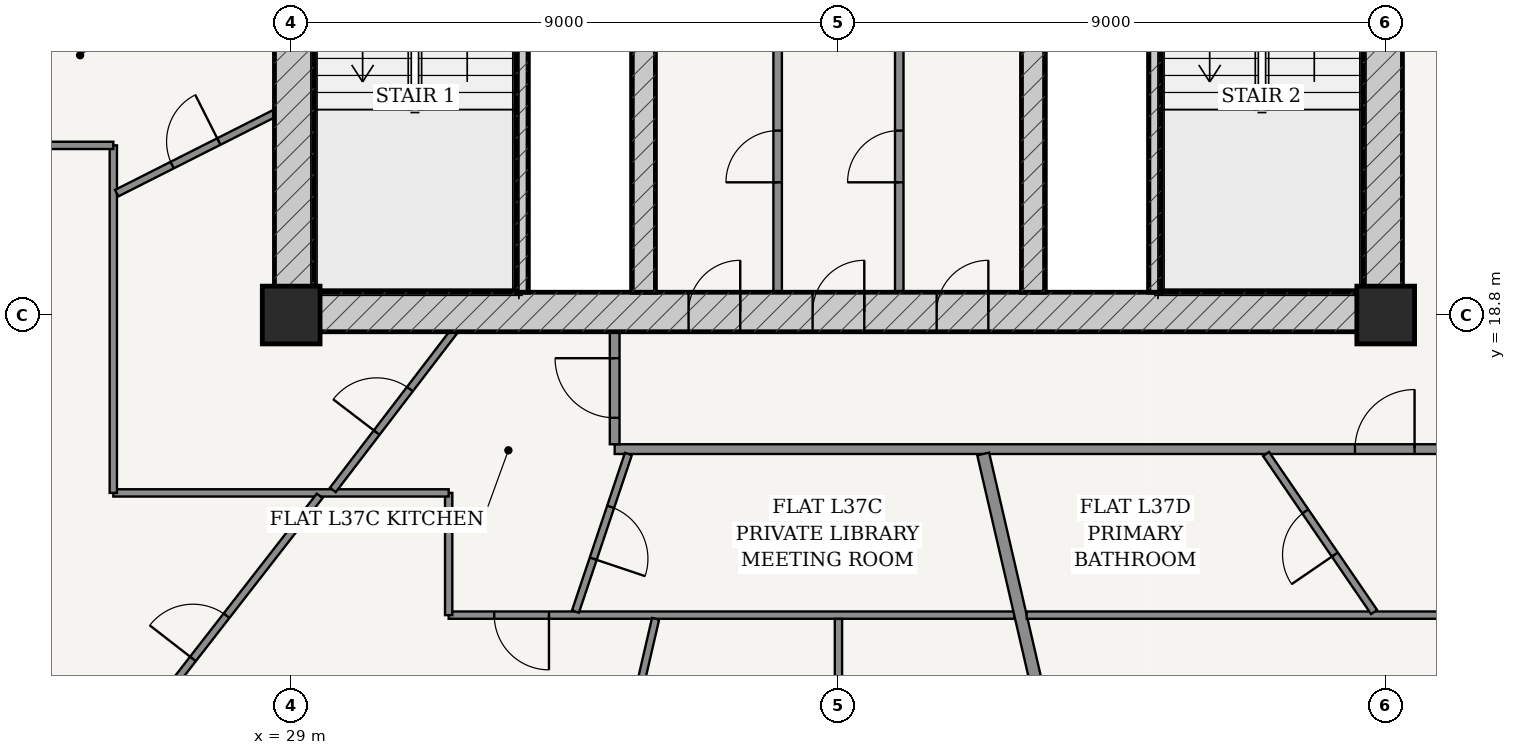
"""IFC4 building model, lengths in metres.
Left out: names, types, materials, properties, quantities, classifications, styles, units other than length and angle.
Written with IfcOpenShell. Run it as: python <this file> out.ifc"""

import sys

from ifc_helpers import new_model, si_unit, direction, frame, frame_2d, origin, origin_2d, place, context, subcontext, project, spatial, rectangle, extrude, source, transform, mapped, element, fill, save


model = new_model("IFC4")
c1 = context("Model", 3, precision=1e-05, world=origin(), true_north=direction((-0.2419218956, 0.970295726276)))
c2 = subcontext(c1, "Body", "Model", "MODEL_VIEW")
j1 = project(units=[si_unit("LENGTHUNIT", "METRE"), si_unit("PLANEANGLEUNIT", "RADIAN")], contexts=[c1])
p1 = place(None, origin())
s1 = spatial("IfcSite", under=j1, at=p1, CompositionType="ELEMENT")
p2 = place(p1, origin())
s2 = spatial("IfcBuilding", under=s1, at=p2, CompositionType="ELEMENT")
p3 = place(p2, frame((0.0, 0.0, 142.6)))
s3 = spatial("IfcBuildingStorey", under=s2, at=p3, CompositionType="ELEMENT", Elevation=142.6)
for number, where, z_axis, x_axis in (
    (1, (29.0, 18.8, 0.0), (0.0, 0.0, 1.0), (1.0, 0.0, 0.0)),
    (2, (47.0, 18.8, 0.0), (0.0, 0.0, 1.0), (1.0, 0.0, 0.0)),
):
    element("IfcColumn", number, at=place(p3, frame(where, z_axis=z_axis, x_axis=x_axis)), inside=s3, PredefinedType="COLUMN", context=c2, shape_type="SweptSolid", body=[
        extrude(rectangle(XDim=0.95, YDim=0.95, at=origin_2d()), origin(), (0.0, 0.0, 1.0), 3.6),
    ])
p4 = place(p3, frame((28.725, 18.85, 0.0), z_axis=(0.0, 0.0, 1.0), x_axis=(1.0, 0.0, 0.0)))
e3 = element("IfcWall", 3, at=p4, inside=s3, PredefinedType="SHEAR", context=c2, shape_type="SweptSolid", body=[
    extrude(rectangle(XDim=18.55, YDim=0.65, at=frame_2d((9.275, 0.0))), origin(), (0.0, 0.0, 1.0), 3.33),
])
p5 = place(p4, frame((6.81, 0.0, 0.0)))
e4 = element("IfcOpeningElement", 4, at=p5, cuts=e3, PredefinedType="OPENING", context=c2, shape_type="SweptSolid", body=[
    extrude(rectangle(XDim=0.85, YDim=2.1, at=frame_2d((0.425, 1.05))), frame((0.0, 0.335, 0.0), z_axis=(0.0, -1.0, 0.0), x_axis=(1.0, 0.0, 0.0)), (0.0, 0.0, 1.0), 0.67),
])
p6 = place(p4, frame((8.85, 0.0, 0.0)))
e5 = element("IfcOpeningElement", 5, at=p6, cuts=e3, PredefinedType="OPENING", context=c2, shape_type="SweptSolid", body=[
    extrude(rectangle(XDim=0.85, YDim=2.1, at=frame_2d((0.425, 1.05))), frame((0.0, 0.335, 0.0), z_axis=(0.0, -1.0, 0.0), x_axis=(1.0, 0.0, 0.0)), (0.0, 0.0, 1.0), 0.67),
])
p7 = place(p4, frame((10.89, 0.0, 0.0)))
e6 = element("IfcOpeningElement", 6, at=p7, cuts=e3, PredefinedType="OPENING", context=c2, shape_type="SweptSolid", body=[
    extrude(rectangle(XDim=0.85, YDim=2.1, at=frame_2d((0.425, 1.05))), frame((0.0, 0.335, 0.0), z_axis=(0.0, -1.0, 0.0), x_axis=(1.0, 0.0, 0.0)), (0.0, 0.0, 1.0), 0.67),
])
p8 = place(p3, frame((29.05, 19.175, 0.0), z_axis=(0.0, 0.0, 1.0), x_axis=(0.0, 1.0, 0.0)))
e7 = element("IfcWall", 7, at=p8, inside=s3, PredefinedType="SHEAR", context=c2, shape_type="SweptSolid", body=[
    extrude(rectangle(XDim=15.25, YDim=0.65, at=frame_2d((7.625, 0.0))), origin(), (0.0, 0.0, 1.0), 3.33),
])
p9 = place(p8, frame((9.875, 0.0, 0.0)))
e8 = element("IfcOpeningElement", 8, at=p9, cuts=e7, PredefinedType="OPENING", context=c2, shape_type="SweptSolid", body=[
    extrude(rectangle(XDim=1.5, YDim=2.2, at=frame_2d((0.75, 1.1))), frame((0.0, 0.335, 0.0), z_axis=(0.0, -1.0, 0.0), x_axis=(1.0, 0.0, 0.0)), (0.0, 0.0, 1.0), 0.67),
])
p10 = place(p3, frame((46.95, 19.175, 0.0), z_axis=(0.0, 0.0, 1.0), x_axis=(0.0, 1.0, 0.0)))
e9 = element("IfcWall", 9, at=p10, inside=s3, PredefinedType="SHEAR", context=c2, shape_type="SweptSolid", body=[
    extrude(rectangle(XDim=15.25, YDim=0.65, at=frame_2d((7.625, 0.0))), origin(), (0.0, 0.0, 1.0), 3.33),
])
p11 = place(p10, frame((9.875, 0.0, 0.0)))
e10 = element("IfcOpeningElement", 10, at=p11, cuts=e9, PredefinedType="OPENING", context=c2, shape_type="SweptSolid", body=[
    extrude(rectangle(XDim=1.5, YDim=2.2, at=frame_2d((0.75, 1.1))), frame((0.0, 0.335, 0.0), z_axis=(0.0, -1.0, 0.0), x_axis=(1.0, 0.0, 0.0)), (0.0, 0.0, 1.0), 0.67),
])
for number, where, z_axis, x_axis in (
    (11, (32.795, 19.175, 0.0), (0.0, 0.0, 1.0), (0.0, 1.0, 0.0)),
    (12, (43.205, 19.175, 0.0), (0.0, 0.0, 1.0), (0.0, 1.0, 0.0)),
):
    element("IfcWall", number, at=place(p3, frame(where, z_axis=z_axis, x_axis=x_axis)), inside=s3, PredefinedType="SOLIDWALL", context=c2, shape_type="SweptSolid", body=[
        extrude(rectangle(XDim=7.375, YDim=0.2, at=frame_2d((3.688, 0.0))), origin(), (0.0, 0.0, 1.0), 3.33),
    ])
p12 = place(p3, frame((34.8, 19.175, 0.0), z_axis=(0.0, 0.0, 1.0), x_axis=(0.0, 1.0, 0.0)))
e13 = element("IfcWall", 13, at=p12, inside=s3, PredefinedType="SHEAR", context=c2, shape_type="SweptSolid", body=[
    extrude(rectangle(XDim=15.25, YDim=0.38, at=frame_2d((7.625, 0.0))), origin(), (0.0, 0.0, 1.0), 3.33),
])
p13 = place(p12, frame((7.8, 0.0, 0.0)))
e14 = element("IfcOpeningElement", 14, at=p13, cuts=e13, PredefinedType="OPENING", context=c2, shape_type="SweptSolid", body=[
    extrude(rectangle(XDim=1.05, YDim=2.15, at=frame_2d((0.525, 1.075))), frame((0.0, 0.2, 0.0), z_axis=(0.0, -1.0, 0.0), x_axis=(1.0, 0.0, 0.0)), (0.0, 0.0, 1.0), 0.4),
])
p14 = place(p3, frame((41.2, 19.175, 0.0), z_axis=(0.0, 0.0, 1.0), x_axis=(0.0, 1.0, 0.0)))
e15 = element("IfcWall", 15, at=p14, inside=s3, PredefinedType="SHEAR", context=c2, shape_type="SweptSolid", body=[
    extrude(rectangle(XDim=15.25, YDim=0.38, at=frame_2d((7.625, 0.0))), origin(), (0.0, 0.0, 1.0), 3.33),
])
p15 = place(p14, frame((7.8, 0.0, 0.0)))
e16 = element("IfcOpeningElement", 16, at=p15, cuts=e15, PredefinedType="OPENING", context=c2, shape_type="SweptSolid", body=[
    extrude(rectangle(XDim=1.05, YDim=2.15, at=frame_2d((0.525, 1.075))), frame((0.0, 0.2, 0.0), z_axis=(0.0, -1.0, 0.0), x_axis=(1.0, 0.0, 0.0)), (0.0, 0.0, 1.0), 0.4),
])
p16 = place(p3, frame((37.0, 19.175, 0.0), z_axis=(0.0, 0.0, 1.0), x_axis=(0.0, 1.0, 0.0)))
e17 = element("IfcWall", 17, at=p16, inside=s3, PredefinedType="PARTITIONING", context=c2, shape_type="SweptSolid", body=[
    extrude(rectangle(XDim=4.465, YDim=0.14, at=frame_2d((2.232, 0.0))), origin(), (0.0, 0.0, 1.0), 3.33),
])
p17 = place(p16, frame((1.808, 0.0, 0.0)))
e18 = element("IfcOpeningElement", 18, at=p17, cuts=e17, PredefinedType="OPENING", context=c2, shape_type="SweptSolid", body=[
    extrude(rectangle(XDim=0.85, YDim=2.1, at=frame_2d((0.425, 1.05))), frame((0.0, 0.08, 0.0), z_axis=(0.0, -1.0, 0.0), x_axis=(1.0, 0.0, 0.0)), (0.0, 0.0, 1.0), 0.16),
])
p18 = place(p3, frame((39.0, 19.175, 0.0), z_axis=(0.0, 0.0, 1.0), x_axis=(0.0, 1.0, 0.0)))
e19 = element("IfcWall", 19, at=p18, inside=s3, PredefinedType="PARTITIONING", context=c2, shape_type="SweptSolid", body=[
    extrude(rectangle(XDim=4.465, YDim=0.14, at=frame_2d((2.232, 0.0))), origin(), (0.0, 0.0, 1.0), 3.33),
])
p19 = place(p18, frame((1.808, 0.0, 0.0)))
e20 = element("IfcOpeningElement", 20, at=p19, cuts=e19, PredefinedType="OPENING", context=c2, shape_type="SweptSolid", body=[
    extrude(rectangle(XDim=0.85, YDim=2.1, at=frame_2d((0.425, 1.05))), frame((0.0, 0.08, 0.0), z_axis=(0.0, -1.0, 0.0), x_axis=(1.0, 0.0, 0.0)), (0.0, 0.0, 1.0), 0.16),
])
p20 = place(p3, frame((34.32, 16.595, 0.0), z_axis=(0.0, 0.0, 1.0), x_axis=(1.0, 0.0, 0.0)))
e21 = element("IfcWall", 21, at=p20, inside=s3, PredefinedType="PARTITIONING", context=c2, shape_type="SweptSolid", body=[
    extrude(rectangle(XDim=14.885, YDim=0.16, at=frame_2d((7.442, 0.0))), origin(), (0.0, 0.0, 1.0), 2.776),
])
p21 = place(p20, frame((12.174, 0.0, 0.0)))
e22 = element("IfcOpeningElement", 22, at=p21, cuts=e21, PredefinedType="OPENING", context=c2, shape_type="SweptSolid", body=[
    extrude(rectangle(XDim=0.98, YDim=2.2, at=frame_2d((0.49, 1.1))), frame((0.0, 0.09, 0.0), z_axis=(0.0, -1.0, 0.0), x_axis=(1.0, 0.0, 0.0)), (0.0, 0.0, 1.0), 0.18),
])
p22 = place(p3, frame((34.32, 16.675, 0.0), z_axis=(0.0, 0.0, 1.0), x_axis=(0.0, 1.0, 0.0)))
e23 = element("IfcWall", 23, at=p22, inside=s3, PredefinedType="PARTITIONING", context=c2, shape_type="SweptSolid", body=[
    extrude(rectangle(XDim=1.85, YDim=0.16, at=frame_2d((0.925, 0.0))), origin(), (0.0, 0.0, 1.0), 3.33),
])
p23 = place(p22, frame((0.435, 0.0, 0.0)))
e24 = element("IfcOpeningElement", 24, at=p23, cuts=e23, PredefinedType="OPENING", context=c2, shape_type="SweptSolid", body=[
    extrude(rectangle(XDim=0.98, YDim=2.2, at=frame_2d((0.49, 1.1))), frame((0.0, 0.09, 0.0), z_axis=(0.0, -1.0, 0.0), x_axis=(1.0, 0.0, 0.0)), (0.0, 0.0, 1.0), 0.18),
])
p24 = place(p3, frame((26.715, 24.871, 0.0), z_axis=(0.0, 0.0, 1.0), x_axis=(-0.985700184834, -0.168508592117, 0.0)))
e25 = element("IfcWall", 25, at=p24, inside=s3, PredefinedType="PARTITIONING", context=c2, shape_type="SweptSolid", body=[
    extrude(rectangle(XDim=12.519, YDim=0.2, at=frame_2d((6.26, 0.0))), origin(), (0.0, 0.0, 1.0), 2.776),
])
p25 = place(p3, frame((40.892, 13.865, 0.0), z_axis=(0.0, 0.0, 1.0), x_axis=(-1.0, 0.0, 0.0)))
e26 = element("IfcWall", 26, at=p25, inside=s3, PredefinedType="PARTITIONING", context=c2, shape_type="SweptSolid", body=[
    extrude(rectangle(XDim=9.302, YDim=0.12, at=frame_2d((4.651, 0.0))), origin(), (0.0, 0.0, 1.0), 2.776),
])
p26 = place(p25, frame((7.652, 0.0, 0.0)))
e27 = element("IfcOpeningElement", 27, at=p26, cuts=e26, PredefinedType="OPENING", context=c2, shape_type="SweptSolid", body=[
    extrude(rectangle(XDim=0.9, YDim=2.15, at=frame_2d((0.45, 1.075))), frame((0.0, 0.07, 0.0), z_axis=(0.0, -1.0, 0.0), x_axis=(1.0, 0.0, 0.0)), (0.0, 0.0, 1.0), 0.14),
])
p27 = place(p3, frame((31.59, 13.865, 0.0), z_axis=(0.0, 0.0, 1.0), x_axis=(0.0, 1.0, 0.0)))
e28 = element("IfcWall", 28, at=p27, inside=s3, PredefinedType="PARTITIONING", context=c2, shape_type="SweptSolid", body=[
    extrude(rectangle(XDim=2.01, YDim=0.12, at=frame_2d((1.005, 0.0))), origin(), (0.0, 0.0, 1.0), 3.005),
])
p28 = place(p3, frame((31.59, 15.875, 0.0), z_axis=(0.0, 0.0, 1.0), x_axis=(-1.0, 0.0, 0.0)))
e29 = element("IfcWall", 29, at=p28, inside=s3, PredefinedType="PARTITIONING", context=c2, shape_type="SweptSolid", body=[
    extrude(rectangle(XDim=5.515, YDim=0.12, at=frame_2d((2.758, 0.0))), origin(), (0.0, 0.0, 1.0), 2.776),
])
p29 = place(p3, frame((26.075, 15.875, 0.0), z_axis=(0.0, 0.0, 1.0), x_axis=(0.0, 1.0, 0.0)))
e30 = element("IfcWall", 30, at=p29, inside=s3, PredefinedType="PARTITIONING", context=c2, shape_type="SweptSolid", body=[
    extrude(rectangle(XDim=5.715, YDim=0.12, at=frame_2d((2.857, 0.0))), origin(), (0.0, 0.0, 1.0), 2.776),
])
p30 = place(p3, frame((26.075, 21.59, 0.0), z_axis=(0.0, 0.0, 1.0), x_axis=(-1.0, 0.0, 0.0)))
e31 = element("IfcWall", 31, at=p30, inside=s3, PredefinedType="PARTITIONING", context=c2, shape_type="SweptSolid", body=[
    extrude(rectangle(XDim=2.01, YDim=0.12, at=frame_2d((1.005, 0.0))), origin(), (0.0, 0.0, 1.0), 3.33),
])
p31 = place(p3, frame((29.469, 15.826, 0.0), z_axis=(0.0, 0.0, 1.0), x_axis=(-0.61373942367, -0.789508657225, 0.0)))
e32 = element("IfcWall", 32, at=p31, inside=s3, PredefinedType="PARTITIONING", context=c2, shape_type="SweptSolid", body=[
    extrude(rectangle(XDim=7.898, YDim=0.12, at=frame_2d((3.949, 0.0))), origin(), (0.0, 0.0, 1.0), 2.776),
])
p32 = place(p31, frame((2.496, 0.0, 0.0)))
e33 = element("IfcOpeningElement", 33, at=p32, cuts=e32, PredefinedType="OPENING", context=c2, shape_type="SweptSolid", body=[
    extrude(rectangle(XDim=0.9, YDim=2.15, at=frame_2d((0.45, 1.075))), frame((0.0, 0.07, 0.0), z_axis=(0.0, -1.0, 0.0), x_axis=(1.0, 0.0, 0.0)), (0.0, 0.0, 1.0), 0.14),
])
p33 = place(p3, frame((34.992, 13.805, 0.0), z_axis=(0.0, 0.0, 1.0), x_axis=(-0.225447000045, -0.974255433739, 0.0)))
e34 = element("IfcWall", 34, at=p33, inside=s3, PredefinedType="PARTITIONING", context=c2, shape_type="SweptSolid", body=[
    extrude(rectangle(XDim=7.496, YDim=0.12, at=frame_2d((3.748, 0.0))), origin(), (0.0, 0.0, 1.0), 2.776),
])
p34 = place(p33, frame((2.289, 0.0, 0.0)))
e35 = element("IfcOpeningElement", 35, at=p34, cuts=e34, PredefinedType="OPENING", context=c2, shape_type="SweptSolid", body=[
    extrude(rectangle(XDim=0.9, YDim=2.15, at=frame_2d((0.45, 1.075))), frame((0.0, 0.07, 0.0), z_axis=(0.0, -1.0, 0.0), x_axis=(1.0, 0.0, 0.0)), (0.0, 0.0, 1.0), 0.14),
])
p35 = place(p3, frame((38.0, 13.803, 0.0), z_axis=(0.0, 0.0, 1.0), x_axis=(0.0, -1.0, 0.0)))
e36 = element("IfcWall", 36, at=p35, inside=s3, PredefinedType="PARTITIONING", context=c2, shape_type="SweptSolid", body=[
    extrude(rectangle(XDim=7.743, YDim=0.12, at=frame_2d((3.872, 0.0))), origin(), (0.0, 0.0, 1.0), 2.846),
])
p36 = place(p35, frame((3.421, 0.0, 0.0)))
e37 = element("IfcOpeningElement", 37, at=p36, cuts=e36, PredefinedType="OPENING", context=c2, shape_type="SweptSolid", body=[
    extrude(rectangle(XDim=0.9, YDim=2.15, at=frame_2d((0.45, 1.075))), frame((0.0, 0.07, 0.0), z_axis=(0.0, -1.0, 0.0), x_axis=(1.0, 0.0, 0.0)), (0.0, 0.0, 1.0), 0.14),
])
p37 = place(p3, frame((28.723, 22.114, 0.0), z_axis=(0.0, 0.0, 1.0), x_axis=(-0.892604354588, -0.450840843504, 0.0)))
e38 = element("IfcWall", 38, at=p37, inside=s3, PredefinedType="PARTITIONING", context=c2, shape_type="SweptSolid", body=[
    extrude(rectangle(XDim=2.905, YDim=0.12, at=frame_2d((1.452, 0.0))), origin(), (0.0, 0.0, 1.0), 3.33),
])
p38 = place(p37, frame((1.022, 0.0, 0.0)))
e39 = element("IfcOpeningElement", 39, at=p38, cuts=e38, PredefinedType="OPENING", context=c2, shape_type="SweptSolid", body=[
    extrude(rectangle(XDim=0.86, YDim=2.15, at=frame_2d((0.43, 1.075))), frame((0.0, 0.07, 0.0), z_axis=(0.0, -1.0, 0.0), x_axis=(1.0, 0.0, 0.0)), (0.0, 0.0, 1.0), 0.14),
])
p39 = place(p3, frame((31.674, 18.525, 0.0), z_axis=(0.0, 0.0, 1.0), x_axis=(-0.607372594471, -0.794417101708, 0.0)))
e40 = element("IfcWall", 40, at=p39, inside=s3, PredefinedType="PARTITIONING", context=c2, shape_type="SweptSolid", body=[
    extrude(rectangle(XDim=3.274, YDim=0.12, at=frame_2d((1.637, 0.0))), origin(), (0.0, 0.0, 1.0), 3.33),
])
p40 = place(p39, frame((1.187, 0.0, 0.0)))
e41 = element("IfcOpeningElement", 41, at=p40, cuts=e40, PredefinedType="OPENING", context=c2, shape_type="SweptSolid", body=[
    extrude(rectangle(XDim=0.9, YDim=2.15, at=frame_2d((0.45, 1.075))), frame((0.0, 0.07, 0.0), z_axis=(0.0, -1.0, 0.0), x_axis=(1.0, 0.0, 0.0)), (0.0, 0.0, 1.0), 0.14),
])
p41 = place(p3, frame((34.545, 16.515, 0.0), z_axis=(0.0, 0.0, 1.0), x_axis=(-0.318424178642, -0.947948333221, 0.0)))
e42 = element("IfcWall", 42, at=p41, inside=s3, PredefinedType="PARTITIONING", context=c2, shape_type="SweptSolid", body=[
    extrude(rectangle(XDim=2.733, YDim=0.12, at=frame_2d((1.367, 0.0))), origin(), (0.0, 0.0, 1.0), 3.33),
])
p42 = place(p41, frame((0.917, 0.0, 0.0)))
e43 = element("IfcOpeningElement", 43, at=p42, cuts=e42, PredefinedType="OPENING", context=c2, shape_type="SweptSolid", body=[
    extrude(rectangle(XDim=0.9, YDim=2.15, at=frame_2d((0.45, 1.075))), frame((0.0, 0.07, 0.0), z_axis=(0.0, -1.0, 0.0), x_axis=(1.0, 0.0, 0.0)), (0.0, 0.0, 1.0), 0.14),
])
p43 = place(p3, frame((40.38, 16.515, 0.0), z_axis=(0.0, 0.0, 1.0), x_axis=(0.225473598067, -0.974249278457, 0.0)))
e44 = element("IfcWall", 44, at=p43, inside=s3, PredefinedType="PARTITIONING", context=c2, shape_type="SweptSolid", body=[
    extrude(rectangle(XDim=10.278, YDim=0.2, at=frame_2d((5.139, 0.0))), origin(), (0.0, 0.0, 1.0), 2.776),
])
p44 = place(p3, frame((51.935, 13.865, 0.0), z_axis=(0.0, 0.0, 1.0), x_axis=(-1.0, 0.0, 0.0)))
e45 = element("IfcWall", 45, at=p44, inside=s3, PredefinedType="PARTITIONING", context=c2, shape_type="SweptSolid", body=[
    extrude(rectangle(XDim=10.84, YDim=0.12, at=frame_2d((5.42, 0.0))), origin(), (0.0, 0.0, 1.0), 2.776),
])
p45 = place(p44, frame((2.281, 0.0, 0.0)))
e46 = element("IfcOpeningElement", 46, at=p45, cuts=e45, PredefinedType="OPENING", context=c2, shape_type="SweptSolid", body=[
    extrude(rectangle(XDim=0.9, YDim=2.15, at=frame_2d((0.45, 1.075))), frame((0.0, 0.07, 0.0), z_axis=(0.0, -1.0, 0.0), x_axis=(1.0, 0.0, 0.0)), (0.0, 0.0, 1.0), 0.14),
])
p46 = place(p3, frame((45.032, 16.515, 0.0), z_axis=(0.0, 0.0, 1.0), x_axis=(0.564486512722, -0.825442291717, 0.0)))
e47 = element("IfcWall", 47, at=p46, inside=s3, PredefinedType="PARTITIONING", context=c2, shape_type="SweptSolid", body=[
    extrude(rectangle(XDim=3.148, YDim=0.12, at=frame_2d((1.574, 0.0))), origin(), (0.0, 0.0, 1.0), 3.005),
])
p47 = place(p46, frame((1.144, 0.0, 0.0)))
e48 = element("IfcOpeningElement", 48, at=p47, cuts=e47, PredefinedType="OPENING", context=c2, shape_type="SweptSolid", body=[
    extrude(rectangle(XDim=0.86, YDim=2.15, at=frame_2d((0.43, 1.075))), frame((0.0, 0.07, 0.0), z_axis=(0.0, -1.0, 0.0), x_axis=(1.0, 0.0, 0.0)), (0.0, 0.0, 1.0), 0.14),
])
m1 = source(origin(), c2, "Body", "SweptSolid", [
    extrude(rectangle(XDim=0.85, YDim=2.1, at=frame_2d((0.425, 1.05))), frame((0.0, 0.025, 0.0), z_axis=(0.0, -1.0, 0.0), x_axis=(1.0, 0.0, 0.0)), (0.0, 0.0, 1.0), 0.05),
])
p48 = place(p5, origin())
e49 = element("IfcDoor", 49, at=p48, inside=s3, OperationType="SINGLE_SWING_RIGHT", PredefinedType="DOOR", context=c2, shape_type="MappedRepresentation", body=[
    mapped(m1, transform((0.0, 0.0, 0.0), scale=1.0)),
])
fill(e4, e49)
p49 = place(p6, origin())
e50 = element("IfcDoor", 50, at=p49, inside=s3, OperationType="SINGLE_SWING_RIGHT", PredefinedType="DOOR", context=c2, shape_type="MappedRepresentation", body=[
    mapped(m1, transform((0.0, 0.0, 0.0), scale=1.0)),
])
fill(e5, e50)
p50 = place(p7, origin())
e51 = element("IfcDoor", 51, at=p50, inside=s3, OperationType="SINGLE_SWING_RIGHT", PredefinedType="DOOR", context=c2, shape_type="MappedRepresentation", body=[
    mapped(m1, transform((0.0, 0.0, 0.0), scale=1.0)),
])
fill(e6, e51)
p51 = place(p17, origin())
e52 = element("IfcDoor", 52, at=p51, inside=s3, OperationType="SINGLE_SWING_LEFT", PredefinedType="DOOR", context=c2, shape_type="MappedRepresentation", body=[
    mapped(m1, transform((0.0, 0.0, 0.0), scale=1.0)),
])
fill(e18, e52)
p52 = place(p19, origin())
e53 = element("IfcDoor", 53, at=p52, inside=s3, OperationType="SINGLE_SWING_LEFT", PredefinedType="DOOR", context=c2, shape_type="MappedRepresentation", body=[
    mapped(m1, transform((0.0, 0.0, 0.0), scale=1.0)),
])
fill(e20, e53)
m2 = source(origin(), c2, "Body", "SweptSolid", [
    extrude(rectangle(XDim=0.98, YDim=2.2, at=frame_2d((0.49, 1.1))), frame((0.0, 0.025, 0.0), z_axis=(0.0, -1.0, 0.0), x_axis=(1.0, 0.0, 0.0)), (0.0, 0.0, 1.0), 0.05),
])
p53 = place(p23, origin())
e54 = element("IfcDoor", 54, at=p53, inside=s3, OperationType="SINGLE_SWING_RIGHT", PredefinedType="DOOR", context=c2, shape_type="MappedRepresentation", body=[
    mapped(m2, transform((0.0, 0.0, 0.0), scale=1.0)),
])
fill(e24, e54)
m3 = source(origin(), c2, "Body", "SweptSolid", [
    extrude(rectangle(XDim=0.9, YDim=2.15, at=frame_2d((0.45, 1.075))), frame((0.0, 0.025, 0.0), z_axis=(0.0, -1.0, 0.0), x_axis=(1.0, 0.0, 0.0)), (0.0, 0.0, 1.0), 0.05),
])
p54 = place(p40, frame((0.9, 0.0, 0.0), z_axis=(0.0, 0.0, 1.0), x_axis=(-1.0, 0.0, 0.0)))
e55 = element("IfcDoor", 55, at=p54, inside=s3, OperationType="SINGLE_SWING_LEFT", PredefinedType="DOOR", context=c2, shape_type="MappedRepresentation", body=[
    mapped(m3, transform((0.0, 0.0, 0.0), scale=1.0)),
])
fill(e41, e55)
p55 = place(p42, origin())
e56 = element("IfcDoor", 56, at=p55, inside=s3, OperationType="SINGLE_SWING_RIGHT", PredefinedType="DOOR", context=c2, shape_type="MappedRepresentation", body=[
    mapped(m3, transform((0.0, 0.0, 0.0), scale=1.0)),
])
fill(e43, e56)
p56 = place(p26, origin())
e57 = element("IfcDoor", 57, at=p56, inside=s3, OperationType="SINGLE_SWING_LEFT", PredefinedType="DOOR", context=c2, shape_type="MappedRepresentation", body=[
    mapped(m3, transform((0.0, 0.0, 0.0), scale=1.0)),
])
fill(e27, e57)
m4 = source(origin(), c2, "Body", "SweptSolid", [
    extrude(rectangle(XDim=0.86, YDim=2.15, at=frame_2d((0.43, 1.075))), frame((0.0, 0.025, 0.0), z_axis=(0.0, -1.0, 0.0), x_axis=(1.0, 0.0, 0.0)), (0.0, 0.0, 1.0), 0.05),
])
p57 = place(p38, frame((0.86, 0.0, 0.0), z_axis=(0.0, 0.0, 1.0), x_axis=(-1.0, 0.0, 0.0)))
e58 = element("IfcDoor", 58, at=p57, inside=s3, OperationType="SINGLE_SWING_RIGHT", PredefinedType="DOOR", context=c2, shape_type="MappedRepresentation", body=[
    mapped(m4, transform((0.0, 0.0, 0.0), scale=1.0)),
])
fill(e39, e58)
p58 = place(p32, frame((0.9, 0.0, 0.0), z_axis=(0.0, 0.0, 1.0), x_axis=(-1.0, 0.0, 0.0)))
e59 = element("IfcDoor", 59, at=p58, inside=s3, OperationType="SINGLE_SWING_LEFT", PredefinedType="DOOR", context=c2, shape_type="MappedRepresentation", body=[
    mapped(m3, transform((0.0, 0.0, 0.0), scale=1.0)),
])
fill(e33, e59)
p59 = place(p21, origin())
e60 = element("IfcDoor", 60, at=p59, inside=s3, OperationType="SINGLE_SWING_RIGHT", PredefinedType="DOOR", context=c2, shape_type="MappedRepresentation", body=[
    mapped(m2, transform((0.0, 0.0, 0.0), scale=1.0)),
])
fill(e22, e60)
p60 = place(p47, frame((0.86, 0.0, 0.0), z_axis=(0.0, 0.0, 1.0), x_axis=(-1.0, 0.0, 0.0)))
e61 = element("IfcDoor", 61, at=p60, inside=s3, OperationType="SINGLE_SWING_LEFT", PredefinedType="DOOR", context=c2, shape_type="MappedRepresentation", body=[
    mapped(m4, transform((0.0, 0.0, 0.0), scale=1.0)),
])
fill(e48, e61)
save(model, sys.argv[1])
